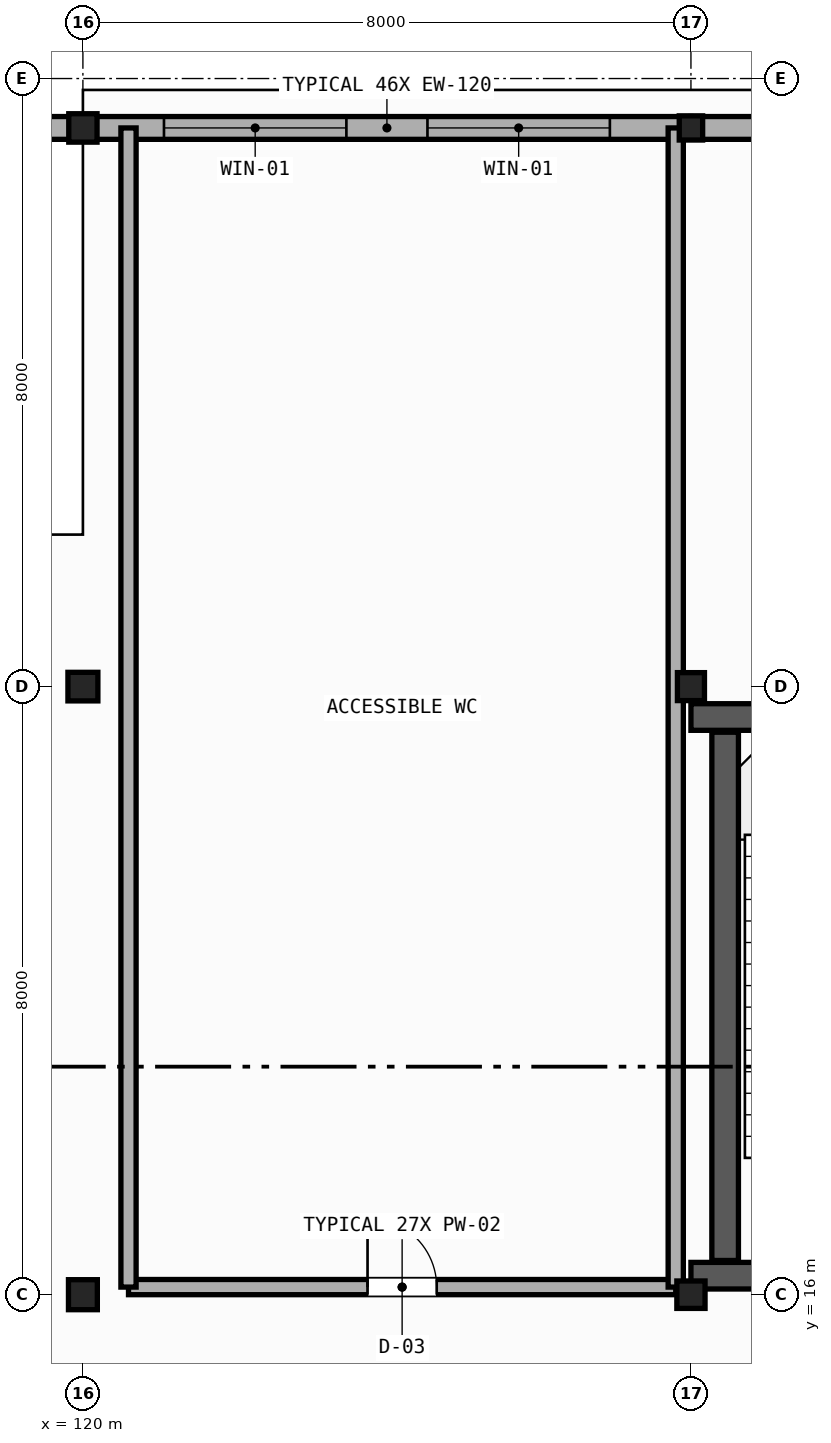
"""IFC4 building model, lengths in metres.
Left out: names, types, materials, properties, quantities, classifications, styles, units other than length and angle.
Written with IfcOpenShell. Run it as: python <this file> out.ifc"""

import sys

from ifc_helpers import new_model, si_unit, direction, frame, frame_2d, origin, origin_2d, place, context, subcontext, project, spatial, rectangle, i_section, extrude, element, fill, save


model = new_model("IFC4")
c1 = context("Model", 3, precision=1e-05, world=origin(), true_north=direction((0.0, 1.0)))
c2 = subcontext(c1, "Body", "Model", "MODEL_VIEW")
j1 = project(units=[si_unit("LENGTHUNIT", "METRE"), si_unit("PLANEANGLEUNIT", "RADIAN")], contexts=[c1])
p1 = place(None, origin())
s1 = spatial("IfcSite", under=j1, at=p1, CompositionType="ELEMENT")
p2 = place(p1, origin())
s2 = spatial("IfcBuilding", under=s1, at=p2, CompositionType="ELEMENT")
p3 = place(p2, origin())
s3 = spatial("IfcBuildingStorey", under=s2, at=p3, CompositionType="ELEMENT", Elevation=0.0)
p4 = place(p3, frame((120.0, 16.0, 0.0), z_axis=(0.0, 0.0, 1.0), x_axis=(0.0, 1.0, 0.0)))
e1 = element("IfcColumn", 1, at=p4, inside=s3, PredefinedType="COLUMN", context=c2, shape_type="SweptSolid", body=[
    extrude(i_section(OverallWidth=0.395, OverallDepth=0.38, WebThickness=0.019, FlangeThickness=0.03, FilletRadius=0.015, at=origin_2d()), origin(), (0.0, 0.0, 1.0), 5.12),
])
p5 = place(p3, frame((120.0, 24.0, 0.0), z_axis=(0.0, 0.0, 1.0), x_axis=(1.0, 0.0, 0.0)))
e2 = element("IfcColumn", 2, at=p5, inside=s3, PredefinedType="COLUMN", context=c2, shape_type="SweptSolid", body=[
    extrude(i_section(OverallWidth=0.394, OverallDepth=0.376, WebThickness=0.017, FlangeThickness=0.028, FilletRadius=0.015, at=origin_2d()), origin(), (0.0, 0.0, 1.0), 5.12),
])
p6 = place(p3, frame((120.0, 31.35, 0.0), z_axis=(0.0, 0.0, 1.0), x_axis=(0.0, 1.0, 0.0)))
e3 = element("IfcColumn", 3, at=p6, inside=s3, PredefinedType="COLUMN", context=c2, shape_type="SweptSolid", body=[
    extrude(i_section(OverallWidth=0.374, OverallDepth=0.372, WebThickness=0.016, FlangeThickness=0.026, FilletRadius=0.015, at=origin_2d()), origin(), (0.0, 0.0, 1.0), 5.12),
])
p7 = place(p3, frame((128.0, 16.0, 0.0), z_axis=(0.0, 0.0, 1.0), x_axis=(1.0, 0.0, 0.0)))
e4 = element("IfcColumn", 4, at=p7, inside=s3, PredefinedType="COLUMN", context=c2, shape_type="SweptSolid", body=[
    extrude(i_section(OverallWidth=0.371, OverallDepth=0.361, WebThickness=0.012, FlangeThickness=0.02, FilletRadius=0.015, at=origin_2d()), origin(), (0.0, 0.0, 1.0), 5.12),
])
p8 = place(p3, frame((128.0, 24.0, 0.0), z_axis=(0.0, 0.0, 1.0), x_axis=(0.0, 1.0, 0.0)))
e5 = element("IfcColumn", 5, at=p8, inside=s3, PredefinedType="COLUMN", context=c2, shape_type="SweptSolid", body=[
    extrude(i_section(OverallWidth=0.368, OverallDepth=0.356, WebThickness=0.011, FlangeThickness=0.018, FilletRadius=0.015, at=origin_2d()), origin(), (0.0, 0.0, 1.0), 5.12),
])
p9 = place(p3, frame((128.0, 31.35, 0.0), z_axis=(0.0, 0.0, 1.0), x_axis=(1.0, 0.0, 0.0)))
e6 = element("IfcColumn", 6, at=p9, inside=s3, PredefinedType="COLUMN", context=c2, shape_type="SweptSolid", body=[
    extrude(i_section(OverallWidth=0.308, OverallDepth=0.318, WebThickness=0.013, FlangeThickness=0.021, FilletRadius=0.013, at=origin_2d()), origin(), (0.0, 0.0, 1.0), 5.12),
])
p10 = place(p3, frame((120.0, 31.35, 0.0), z_axis=(0.0, 0.0, 1.0), x_axis=(1.0, 0.0, 0.0)))
e7 = element("IfcWall", 7, at=p10, inside=s3, PredefinedType="STANDARD", context=c2, shape_type="SweptSolid", body=[
    extrude(rectangle(XDim=8.0, YDim=0.3, at=frame_2d((4.0, 0.0))), origin(), (0.0, 0.0, 1.0), 4.318),
])
p11 = place(p10, frame((1.067, 0.0, 0.85)))
e8 = element("IfcOpeningElement", 8, at=p11, cuts=e7, PredefinedType="OPENING", context=c2, shape_type="SweptSolid", body=[
    extrude(rectangle(XDim=2.4, YDim=2.9, at=frame_2d((1.2, 1.45))), frame((0.0, 0.16, 0.0), z_axis=(0.0, -1.0, 0.0), x_axis=(1.0, 0.0, 0.0)), (0.0, 0.0, 1.0), 0.32),
])
p12 = place(p10, frame((4.533, 0.0, 0.85)))
e9 = element("IfcOpeningElement", 9, at=p12, cuts=e7, PredefinedType="OPENING", context=c2, shape_type="SweptSolid", body=[
    extrude(rectangle(XDim=2.4, YDim=2.9, at=frame_2d((1.2, 1.45))), frame((0.0, 0.16, 0.0), z_axis=(0.0, -1.0, 0.0), x_axis=(1.0, 0.0, 0.0)), (0.0, 0.0, 1.0), 0.32),
])
p13 = place(p3, frame((128.0, 31.35, 0.0), z_axis=(0.0, 0.0, 1.0), x_axis=(1.0, 0.0, 0.0)))
e10 = element("IfcWall", 10, at=p13, inside=s3, PredefinedType="STANDARD", context=c2, shape_type="SweptSolid", body=[
    extrude(rectangle(XDim=8.0, YDim=0.3, at=frame_2d((4.0, 0.0))), origin(), (0.0, 0.0, 1.0), 4.28),
])
p14 = place(p13, frame((1.6, 0.0, 0.95)))
e11 = element("IfcOpeningElement", 11, at=p14, cuts=e10, PredefinedType="OPENING", context=c2, shape_type="SweptSolid", body=[
    extrude(rectangle(XDim=1.6, YDim=2.3, at=frame_2d((0.8, 1.15))), frame((0.0, 0.16, 0.0), z_axis=(0.0, -1.0, 0.0), x_axis=(1.0, 0.0, 0.0)), (0.0, 0.0, 1.0), 0.32),
])
p15 = place(p13, frame((4.8, 0.0, 0.95)))
e12 = element("IfcOpeningElement", 12, at=p15, cuts=e10, PredefinedType="OPENING", context=c2, shape_type="SweptSolid", body=[
    extrude(rectangle(XDim=1.6, YDim=2.3, at=frame_2d((0.8, 1.15))), frame((0.0, 0.16, 0.0), z_axis=(0.0, -1.0, 0.0), x_axis=(1.0, 0.0, 0.0)), (0.0, 0.0, 1.0), 0.32),
])
p16 = place(p3, frame((112.65, 31.35, 0.0), z_axis=(0.0, 0.0, 1.0), x_axis=(1.0, 0.0, 0.0)))
e13 = element("IfcWall", 13, at=p16, inside=s3, PredefinedType="STANDARD", context=c2, shape_type="SweptSolid", body=[
    extrude(rectangle(XDim=7.35, YDim=0.3, at=frame_2d((3.675, 0.0))), origin(), (0.0, 0.0, 1.0), 4.547),
])
p17 = place(p16, frame((2.775, 0.0, 0.0)))
e14 = element("IfcOpeningElement", 14, at=p17, cuts=e13, PredefinedType="OPENING", context=c2, shape_type="SweptSolid", body=[
    extrude(rectangle(XDim=1.8, YDim=2.35, at=frame_2d((0.9, 1.175))), frame((0.0, 0.16, 0.0), z_axis=(0.0, -1.0, 0.0), x_axis=(1.0, 0.0, 0.0)), (0.0, 0.0, 1.0), 0.32),
])
p18 = place(p3, frame((128.0, 16.25, 0.0), z_axis=(0.0, 0.0, 1.0), x_axis=(1.0, 0.0, 0.0)))
e15 = element("IfcWall", 15, at=p18, inside=s3, PredefinedType="SHEAR", context=c2, shape_type="SweptSolid", body=[
    extrude(rectangle(XDim=5.85, YDim=0.35, at=frame_2d((2.925, 0.0))), origin(), (0.0, 0.0, 1.0), 5.11),
])
p19 = place(p18, frame((1.4, 0.0, 0.0)))
e16 = element("IfcOpeningElement", 16, at=p19, cuts=e15, PredefinedType="OPENING", context=c2, shape_type="SweptSolid", body=[
    extrude(rectangle(XDim=1.05, YDim=2.1, at=frame_2d((0.525, 1.05))), frame((0.0, 0.185, 0.0), z_axis=(0.0, -1.0, 0.0), x_axis=(1.0, 0.0, 0.0)), (0.0, 0.0, 1.0), 0.37),
])
p20 = place(p18, frame((4.25, 0.0, 0.0)))
e17 = element("IfcOpeningElement", 17, at=p20, cuts=e15, PredefinedType="OPENING", context=c2, shape_type="SweptSolid", body=[
    extrude(rectangle(XDim=1.0, YDim=2.15, at=frame_2d((0.5, 1.075))), frame((0.0, 0.185, 0.0), z_axis=(0.0, -1.0, 0.0), x_axis=(1.0, 0.0, 0.0)), (0.0, 0.0, 1.0), 0.37),
])
p21 = place(p3, frame((128.0, 23.6, 0.0), z_axis=(0.0, 0.0, 1.0), x_axis=(1.0, 0.0, 0.0)))
e18 = element("IfcWall", 18, at=p21, inside=s3, PredefinedType="SHEAR", context=c2, shape_type="SweptSolid", body=[
    extrude(rectangle(XDim=5.85, YDim=0.35, at=frame_2d((2.925, 0.0))), origin(), (0.0, 0.0, 1.0), 5.11),
])
p22 = place(p3, frame((128.45, 16.45, 0.0), z_axis=(0.0, 0.0, 1.0), x_axis=(0.0, 1.0, 0.0)))
e19 = element("IfcWall", 19, at=p22, inside=s3, PredefinedType="SHEAR", context=c2, shape_type="SweptSolid", body=[
    extrude(rectangle(XDim=6.95, YDim=0.35, at=frame_2d((3.475, 0.0))), origin(), (0.0, 0.0, 1.0), 5.11),
])
p23 = place(p3, frame((120.6, 16.1, 0.0), z_axis=(0.0, 0.0, 1.0), x_axis=(1.0, 0.0, 0.0)))
e20 = element("IfcWall", 20, at=p23, inside=s3, PredefinedType="PLUMBINGWALL", context=c2, shape_type="SweptSolid", body=[
    extrude(rectangle(XDim=7.2, YDim=0.2, at=frame_2d((3.6, 0.0))), origin(), (0.0, 0.0, 1.0), 4.29),
])
p24 = place(p23, frame((3.145, 0.0, 0.0)))
e21 = element("IfcOpeningElement", 21, at=p24, cuts=e20, PredefinedType="OPENING", context=c2, shape_type="SweptSolid", body=[
    extrude(rectangle(XDim=0.91, YDim=2.1, at=frame_2d((0.455, 1.05))), frame((0.0, 0.11, 0.0), z_axis=(0.0, -1.0, 0.0), x_axis=(1.0, 0.0, 0.0)), (0.0, 0.0, 1.0), 0.22),
])
for number, where, z_axis, x_axis in (
    (22, (120.6, 16.1, 0.0), (0.0, 0.0, 1.0), (0.0, 1.0, 0.0)),
    (23, (127.8, 16.1, 0.0), (0.0, 0.0, 1.0), (0.0, 1.0, 0.0)),
):
    element("IfcWall", number, at=place(p3, frame(where, z_axis=z_axis, x_axis=x_axis)), inside=s3, PredefinedType="PLUMBINGWALL", context=c2, shape_type="SweptSolid", body=[
        extrude(rectangle(XDim=15.25, YDim=0.2, at=frame_2d((7.625, 0.0))), origin(), (0.0, 0.0, 1.0), 4.29),
    ])
p25 = place(p11, origin())
e24 = element("IfcWindow", 24, at=p25, inside=s3, PartitioningType="SINGLE_PANEL", PredefinedType="WINDOW", context=c2, shape_type="SweptSolid", body=[
    extrude(rectangle(XDim=2.4, YDim=2.9, at=frame_2d((1.2, 1.45))), frame((0.0, 0.03, 0.0), z_axis=(0.0, -1.0, 0.0), x_axis=(1.0, 0.0, 0.0)), (0.0, 0.0, 1.0), 0.06),
])
fill(e8, e24)
p26 = place(p12, origin())
e25 = element("IfcWindow", 25, at=p26, inside=s3, PartitioningType="SINGLE_PANEL", PredefinedType="WINDOW", context=c2, shape_type="SweptSolid", body=[
    extrude(rectangle(XDim=2.4, YDim=2.9, at=frame_2d((1.2, 1.45))), frame((0.0, 0.03, 0.0), z_axis=(0.0, -1.0, 0.0), x_axis=(1.0, 0.0, 0.0)), (0.0, 0.0, 1.0), 0.06),
])
fill(e9, e25)
p27 = place(p24, origin())
e26 = element("IfcDoor", 26, at=p27, inside=s3, OperationType="SINGLE_SWING_LEFT", PredefinedType="DOOR", context=c2, shape_type="SweptSolid", body=[
    extrude(rectangle(XDim=0.91, YDim=2.1, at=frame_2d((0.455, 1.05))), frame((0.0, 0.025, 0.0), z_axis=(0.0, -1.0, 0.0), x_axis=(1.0, 0.0, 0.0)), (0.0, 0.0, 1.0), 0.05),
])
fill(e21, e26)
save(model, sys.argv[1])
